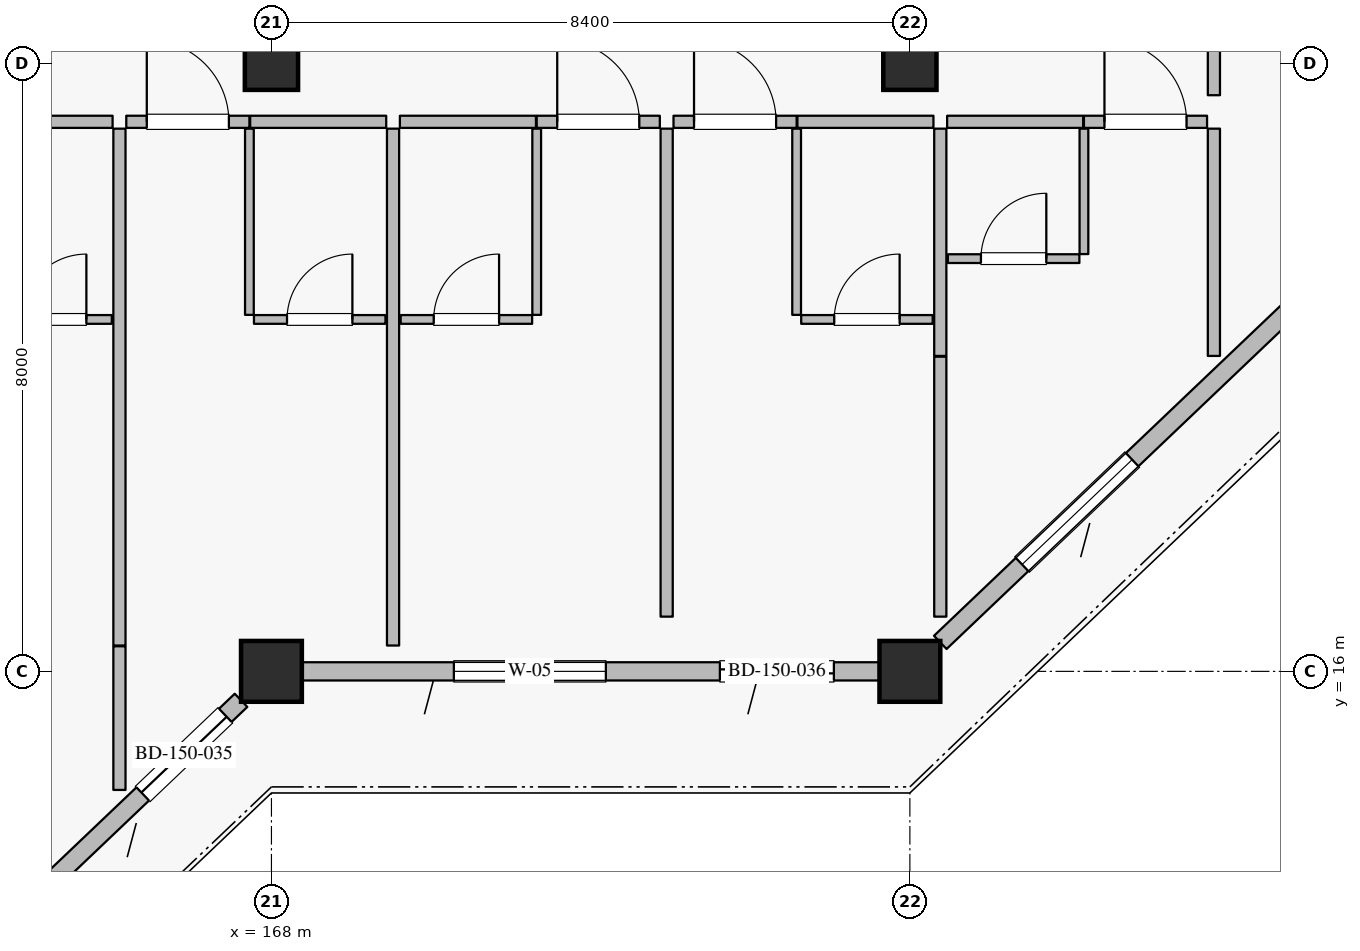
"""IFC4 building model, lengths in metres.
Left out: names, types, materials, properties, quantities, classifications, styles, units other than length and angle.
Written with IfcOpenShell. Run it as: python <this file> out.ifc"""

import sys

from ifc_helpers import new_model, si_unit, direction, frame, frame_2d, origin, origin_2d, place, context, subcontext, project, spatial, rectangle, extrude, element, fill, save


model = new_model("IFC4")
c1 = context("Model", 3, precision=1e-05, world=origin(), true_north=direction((0.0, 1.0)))
c2 = subcontext(c1, "Body", "Model", "MODEL_VIEW")
j1 = project(units=[si_unit("LENGTHUNIT", "METRE"), si_unit("PLANEANGLEUNIT", "RADIAN")], contexts=[c1])
p1 = place(None, origin())
s1 = spatial("IfcSite", under=j1, at=p1, CompositionType="ELEMENT")
p2 = place(p1, origin())
s2 = spatial("IfcBuilding", under=s1, at=p2, CompositionType="ELEMENT")
p3 = place(p2, frame((0.0, 0.0, 21.0)))
s3 = spatial("IfcBuildingStorey", under=s2, at=p3, CompositionType="ELEMENT", Elevation=21.0)
for number, where, z_axis, x_axis in (
    (1, (168.0, 16.0, 0.0), (0.0, 0.0, 1.0), (1.0, 0.0, 0.0)),
    (2, (176.4, 16.0, 0.0), (0.0, 0.0, 1.0), (1.0, 0.0, 0.0)),
):
    element("IfcColumn", number, at=place(p3, frame(where, z_axis=z_axis, x_axis=x_axis)), inside=s3, PredefinedType="COLUMN", context=c2, shape_type="SweptSolid", body=[
        extrude(rectangle(XDim=0.8, YDim=0.8, at=origin_2d()), origin(), (0.0, 0.0, 1.0), 4.2),
    ])
for number, where, z_axis, x_axis in (
    (3, (168.0, 24.0, 0.0), (0.0, 0.0, 1.0), (1.0, 0.0, 0.0)),
    (4, (176.4, 24.0, 0.0), (0.0, 0.0, 1.0), (1.0, 0.0, 0.0)),
):
    element("IfcColumn", number, at=place(p3, frame(where, z_axis=z_axis, x_axis=x_axis)), inside=s3, PredefinedType="COLUMN", context=c2, shape_type="SweptSolid", body=[
        extrude(rectangle(XDim=0.7, YDim=0.7, at=origin_2d()), origin(), (0.0, 0.0, 1.0), 4.2),
    ])
p4 = place(p3, frame((167.6, 15.619, 0.0), z_axis=(0.0, 0.0, 1.0), x_axis=(-0.724156739794, -0.689635422677, 0.0)))
e5 = element("IfcWall", 5, at=p4, inside=s3, PredefinedType="SOLIDWALL", context=c2, shape_type="SweptSolid", body=[
    extrude(rectangle(XDim=10.495, YDim=0.24, at=frame_2d((5.248, 0.0))), origin(), (0.0, 0.0, 1.0), 3.53),
])
p5 = place(p4, frame((0.286, 0.0, 0.0)))
e6 = element("IfcOpeningElement", 6, at=p5, cuts=e5, PredefinedType="OPENING", context=c2, shape_type="SweptSolid", body=[
    extrude(rectangle(XDim=1.5, YDim=2.25, at=frame_2d((0.75, 1.125))), frame((0.0, 0.13, 0.0), z_axis=(0.0, -1.0, 0.0), x_axis=(1.0, 0.0, 0.0)), (0.0, 0.0, 1.0), 0.26),
])
p6 = place(p4, frame((3.757, 0.0, 0.8)))
e7 = element("IfcOpeningElement", 7, at=p6, cuts=e5, PredefinedType="OPENING", context=c2, shape_type="SweptSolid", body=[
    extrude(rectangle(XDim=1.6, YDim=1.6, at=frame_2d((0.8, 0.8))), frame((0.0, 0.13, 0.0), z_axis=(0.0, -1.0, 0.0), x_axis=(1.0, 0.0, 0.0)), (0.0, 0.0, 1.0), 0.26),
])
p7 = place(p4, frame((7.969, 0.0, 0.8)))
e8 = element("IfcOpeningElement", 8, at=p7, cuts=e5, PredefinedType="OPENING", context=c2, shape_type="SweptSolid", body=[
    extrude(rectangle(XDim=1.6, YDim=1.6, at=frame_2d((0.8, 0.8))), frame((0.0, 0.13, 0.0), z_axis=(0.0, -1.0, 0.0), x_axis=(1.0, 0.0, 0.0)), (0.0, 0.0, 1.0), 0.26),
])
p8 = place(p3, frame((176.0, 16.0, 0.0), z_axis=(0.0, 0.0, 1.0), x_axis=(-1.0, 0.0, 0.0)))
e9 = element("IfcWall", 9, at=p8, inside=s3, PredefinedType="SOLIDWALL", context=c2, shape_type="SweptSolid", body=[
    extrude(rectangle(XDim=7.6, YDim=0.24, at=frame_2d((3.8, 0.0))), origin(), (0.0, 0.0, 1.0), 3.53),
])
p9 = place(p8, frame((0.6, 0.0, 0.0)))
e10 = element("IfcOpeningElement", 10, at=p9, cuts=e9, PredefinedType="OPENING", context=c2, shape_type="SweptSolid", body=[
    extrude(rectangle(XDim=1.5, YDim=2.25, at=frame_2d((0.75, 1.125))), frame((0.0, 0.13, 0.0), z_axis=(0.0, -1.0, 0.0), x_axis=(1.0, 0.0, 0.0)), (0.0, 0.0, 1.0), 0.26),
])
p10 = place(p8, frame((3.6, 0.0, 0.8)))
e11 = element("IfcOpeningElement", 11, at=p10, cuts=e9, PredefinedType="OPENING", context=c2, shape_type="SweptSolid", body=[
    extrude(rectangle(XDim=2.0, YDim=1.75, at=frame_2d((1.0, 0.875))), frame((0.0, 0.13, 0.0), z_axis=(0.0, -1.0, 0.0), x_axis=(1.0, 0.0, 0.0)), (0.0, 0.0, 1.0), 0.26),
])
p11 = place(p3, frame((184.4, 23.619, 0.0), z_axis=(0.0, 0.0, 1.0), x_axis=(-0.724145676014, -0.689647040094, 0.0)))
e12 = element("IfcWall", 12, at=p11, inside=s3, PredefinedType="SOLIDWALL", context=c2, shape_type="SweptSolid", body=[
    extrude(rectangle(XDim=10.495, YDim=0.24, at=frame_2d((5.248, 0.0))), origin(), (0.0, 0.0, 1.0), 3.53),
])
p12 = place(p11, frame((2.288, 0.0, 0.0)))
e13 = element("IfcOpeningElement", 13, at=p12, cuts=e12, PredefinedType="OPENING", context=c2, shape_type="SweptSolid", body=[
    extrude(rectangle(XDim=1.5, YDim=2.25, at=frame_2d((0.75, 1.125))), frame((0.0, 0.13, 0.0), z_axis=(0.0, -1.0, 0.0), x_axis=(1.0, 0.0, 0.0)), (0.0, 0.0, 1.0), 0.26),
])
p13 = place(p11, frame((7.009, 0.0, 0.8)))
e14 = element("IfcOpeningElement", 14, at=p13, cuts=e12, PredefinedType="OPENING", context=c2, shape_type="SweptSolid", body=[
    extrude(rectangle(XDim=2.0, YDim=1.75, at=frame_2d((1.0, 0.875))), frame((0.0, 0.13, 0.0), z_axis=(0.0, -1.0, 0.0), x_axis=(1.0, 0.0, 0.0)), (0.0, 0.0, 1.0), 0.26),
])
p14 = place(p3, frame((164.32, 23.23, 0.0), z_axis=(0.0, 0.0, 1.0), x_axis=(1.0, 0.0, 0.0)))
e15 = element("IfcWall", 15, at=p14, inside=s3, PredefinedType="PARTITIONING", context=c2, shape_type="SweptSolid", body=[
    extrude(rectangle(XDim=1.59, YDim=0.16, at=frame_2d((0.795, 0.0))), origin(), (0.0, 0.0, 1.0), 3.965),
])
p15 = place(p3, frame((164.37, 20.63, 0.0), z_axis=(0.0, 0.0, 1.0), x_axis=(1.0, 0.0, 0.0)))
e16 = element("IfcWall", 16, at=p15, inside=s3, PredefinedType="PARTITIONING", context=c2, shape_type="SweptSolid", body=[
    extrude(rectangle(XDim=1.53, YDim=0.115, at=frame_2d((0.765, 0.0))), origin(), (0.0, 0.0, 1.0), 3.965),
])
p16 = place(p15, frame((0.335, 0.0, 0.0)))
e17 = element("IfcOpeningElement", 17, at=p16, cuts=e16, PredefinedType="OPENING", context=c2, shape_type="SweptSolid", body=[
    extrude(rectangle(XDim=0.86, YDim=2.12, at=frame_2d((0.43, 1.06))), frame((0.0, 0.067, 0.0), z_axis=(0.0, -1.0, 0.0), x_axis=(1.0, 0.0, 0.0)), (0.0, 0.0, 1.0), 0.135),
])
p17 = place(p3, frame((166.0, 14.44, 0.0), z_axis=(0.0, 0.0, 1.0), x_axis=(0.0, 1.0, 0.0)))
e18 = element("IfcWall", 18, at=p17, inside=s3, PredefinedType="PARTITIONING", context=c2, shape_type="SweptSolid", body=[
    extrude(rectangle(XDim=1.89, YDim=0.16, at=frame_2d((0.945, 0.0))), origin(), (0.0, 0.0, 1.0), 3.965),
])
p18 = place(p3, frame((166.09, 23.23, 0.0), z_axis=(0.0, 0.0, 1.0), x_axis=(1.0, 0.0, 0.0)))
e19 = element("IfcWall", 19, at=p18, inside=s3, PredefinedType="PARTITIONING", context=c2, shape_type="SweptSolid", body=[
    extrude(rectangle(XDim=1.62, YDim=0.16, at=frame_2d((0.81, 0.0))), origin(), (0.0, 0.0, 1.0), 3.965),
])
p19 = place(p18, frame((0.27, 0.0, 0.0)))
e20 = element("IfcOpeningElement", 20, at=p19, cuts=e19, PredefinedType="OPENING", context=c2, shape_type="SweptSolid", body=[
    extrude(rectangle(XDim=1.08, YDim=2.3, at=frame_2d((0.54, 1.15))), frame((0.0, 0.09, 0.0), z_axis=(0.0, -1.0, 0.0), x_axis=(1.0, 0.0, 0.0)), (0.0, 0.0, 1.0), 0.18),
])
p20 = place(p3, frame((167.72, 23.23, 0.0), z_axis=(0.0, 0.0, 1.0), x_axis=(1.0, 0.0, 0.0)))
e21 = element("IfcWall", 21, at=p20, inside=s3, PredefinedType="PARTITIONING", context=c2, shape_type="SweptSolid", body=[
    extrude(rectangle(XDim=1.79, YDim=0.16, at=frame_2d((0.895, 0.0))), origin(), (0.0, 0.0, 1.0), 3.965),
])
p21 = place(p3, frame((167.71, 20.69, 0.0), z_axis=(0.0, 0.0, 1.0), x_axis=(0.0, 1.0, 0.0)))
e22 = element("IfcWall", 22, at=p21, inside=s3, PredefinedType="PARTITIONING", context=c2, shape_type="SweptSolid", body=[
    extrude(rectangle(XDim=2.45, YDim=0.115, at=frame_2d((1.225, 0.0))), origin(), (0.0, 0.0, 1.0), 3.965),
])
p22 = place(p3, frame((167.77, 20.63, 0.0), z_axis=(0.0, 0.0, 1.0), x_axis=(1.0, 0.0, 0.0)))
e23 = element("IfcWall", 23, at=p22, inside=s3, PredefinedType="PARTITIONING", context=c2, shape_type="SweptSolid", body=[
    extrude(rectangle(XDim=1.73, YDim=0.115, at=frame_2d((0.865, 0.0))), origin(), (0.0, 0.0, 1.0), 3.965),
])
p23 = place(p22, frame((0.435, 0.0, 0.0)))
e24 = element("IfcOpeningElement", 24, at=p23, cuts=e23, PredefinedType="OPENING", context=c2, shape_type="SweptSolid", body=[
    extrude(rectangle(XDim=0.86, YDim=2.12, at=frame_2d((0.43, 1.06))), frame((0.0, 0.067, 0.0), z_axis=(0.0, -1.0, 0.0), x_axis=(1.0, 0.0, 0.0)), (0.0, 0.0, 1.0), 0.135),
])
p24 = place(p3, frame((166.0, 16.34, 0.0), z_axis=(0.0, 0.0, 1.0), x_axis=(0.0, 1.0, 0.0)))
e25 = element("IfcWall", 25, at=p24, inside=s3, PredefinedType="PARTITIONING", context=c2, shape_type="SweptSolid", body=[
    extrude(rectangle(XDim=6.8, YDim=0.16, at=frame_2d((3.4, 0.0))), origin(), (0.0, 0.0, 1.0), 3.965),
])
p25 = place(p3, frame((169.69, 23.23, 0.0), z_axis=(0.0, 0.0, 1.0), x_axis=(1.0, 0.0, 0.0)))
e26 = element("IfcWall", 26, at=p25, inside=s3, PredefinedType="PARTITIONING", context=c2, shape_type="SweptSolid", body=[
    extrude(rectangle(XDim=1.79, YDim=0.16, at=frame_2d((0.895, 0.0))), origin(), (0.0, 0.0, 1.0), 3.965),
])
p26 = place(p3, frame((171.49, 23.23, 0.0), z_axis=(0.0, 0.0, 1.0), x_axis=(1.0, 0.0, 0.0)))
e27 = element("IfcWall", 27, at=p26, inside=s3, PredefinedType="PARTITIONING", context=c2, shape_type="SweptSolid", body=[
    extrude(rectangle(XDim=1.62, YDim=0.16, at=frame_2d((0.81, 0.0))), origin(), (0.0, 0.0, 1.0), 3.965),
])
p27 = place(p26, frame((0.27, 0.0, 0.0)))
e28 = element("IfcOpeningElement", 28, at=p27, cuts=e27, PredefinedType="OPENING", context=c2, shape_type="SweptSolid", body=[
    extrude(rectangle(XDim=1.08, YDim=2.3, at=frame_2d((0.54, 1.15))), frame((0.0, 0.09, 0.0), z_axis=(0.0, -1.0, 0.0), x_axis=(1.0, 0.0, 0.0)), (0.0, 0.0, 1.0), 0.18),
])
p28 = place(p3, frame((171.49, 20.69, 0.0), z_axis=(0.0, 0.0, 1.0), x_axis=(0.0, 1.0, 0.0)))
e29 = element("IfcWall", 29, at=p28, inside=s3, PredefinedType="PARTITIONING", context=c2, shape_type="SweptSolid", body=[
    extrude(rectangle(XDim=2.45, YDim=0.115, at=frame_2d((1.225, 0.0))), origin(), (0.0, 0.0, 1.0), 3.965),
])
p29 = place(p3, frame((169.7, 20.63, 0.0), z_axis=(0.0, 0.0, 1.0), x_axis=(1.0, 0.0, 0.0)))
e30 = element("IfcWall", 30, at=p29, inside=s3, PredefinedType="PARTITIONING", context=c2, shape_type="SweptSolid", body=[
    extrude(rectangle(XDim=1.73, YDim=0.115, at=frame_2d((0.865, 0.0))), origin(), (0.0, 0.0, 1.0), 3.965),
])
p30 = place(p29, frame((0.435, 0.0, 0.0)))
e31 = element("IfcOpeningElement", 31, at=p30, cuts=e30, PredefinedType="OPENING", context=c2, shape_type="SweptSolid", body=[
    extrude(rectangle(XDim=0.86, YDim=2.12, at=frame_2d((0.43, 1.06))), frame((0.0, 0.067, 0.0), z_axis=(0.0, -1.0, 0.0), x_axis=(1.0, 0.0, 0.0)), (0.0, 0.0, 1.0), 0.135),
])
p31 = place(p3, frame((169.6, 16.34, 0.0), z_axis=(0.0, 0.0, 1.0), x_axis=(0.0, 1.0, 0.0)))
e32 = element("IfcWall", 32, at=p31, inside=s3, PredefinedType="PARTITIONING", context=c2, shape_type="SweptSolid", body=[
    extrude(rectangle(XDim=6.8, YDim=0.16, at=frame_2d((3.4, 0.0))), origin(), (0.0, 0.0, 1.0), 3.965),
])
p32 = place(p3, frame((173.29, 23.23, 0.0), z_axis=(0.0, 0.0, 1.0), x_axis=(1.0, 0.0, 0.0)))
e33 = element("IfcWall", 33, at=p32, inside=s3, PredefinedType="PARTITIONING", context=c2, shape_type="SweptSolid", body=[
    extrude(rectangle(XDim=1.62, YDim=0.16, at=frame_2d((0.81, 0.0))), origin(), (0.0, 0.0, 1.0), 3.965),
])
p33 = place(p32, frame((0.27, 0.0, 0.0)))
e34 = element("IfcOpeningElement", 34, at=p33, cuts=e33, PredefinedType="OPENING", context=c2, shape_type="SweptSolid", body=[
    extrude(rectangle(XDim=1.08, YDim=2.3, at=frame_2d((0.54, 1.15))), frame((0.0, 0.09, 0.0), z_axis=(0.0, -1.0, 0.0), x_axis=(1.0, 0.0, 0.0)), (0.0, 0.0, 1.0), 0.18),
])
p34 = place(p3, frame((174.92, 23.23, 0.0), z_axis=(0.0, 0.0, 1.0), x_axis=(1.0, 0.0, 0.0)))
e35 = element("IfcWall", 35, at=p34, inside=s3, PredefinedType="PARTITIONING", context=c2, shape_type="SweptSolid", body=[
    extrude(rectangle(XDim=1.79, YDim=0.16, at=frame_2d((0.895, 0.0))), origin(), (0.0, 0.0, 1.0), 3.965),
])
p35 = place(p3, frame((174.91, 20.69, 0.0), z_axis=(0.0, 0.0, 1.0), x_axis=(0.0, 1.0, 0.0)))
e36 = element("IfcWall", 36, at=p35, inside=s3, PredefinedType="PARTITIONING", context=c2, shape_type="SweptSolid", body=[
    extrude(rectangle(XDim=2.45, YDim=0.115, at=frame_2d((1.225, 0.0))), origin(), (0.0, 0.0, 1.0), 3.965),
])
p36 = place(p3, frame((174.97, 20.63, 0.0), z_axis=(0.0, 0.0, 1.0), x_axis=(1.0, 0.0, 0.0)))
e37 = element("IfcWall", 37, at=p36, inside=s3, PredefinedType="PARTITIONING", context=c2, shape_type="SweptSolid", body=[
    extrude(rectangle(XDim=1.73, YDim=0.115, at=frame_2d((0.865, 0.0))), origin(), (0.0, 0.0, 1.0), 3.965),
])
p37 = place(p36, frame((0.435, 0.0, 0.0)))
e38 = element("IfcOpeningElement", 38, at=p37, cuts=e37, PredefinedType="OPENING", context=c2, shape_type="SweptSolid", body=[
    extrude(rectangle(XDim=0.86, YDim=2.12, at=frame_2d((0.43, 1.06))), frame((0.0, 0.067, 0.0), z_axis=(0.0, -1.0, 0.0), x_axis=(1.0, 0.0, 0.0)), (0.0, 0.0, 1.0), 0.135),
])
p38 = place(p3, frame((173.2, 16.72, 0.0), z_axis=(0.0, 0.0, 1.0), x_axis=(0.0, 1.0, 0.0)))
e39 = element("IfcWall", 39, at=p38, inside=s3, PredefinedType="PARTITIONING", context=c2, shape_type="SweptSolid", body=[
    extrude(rectangle(XDim=6.42, YDim=0.16, at=frame_2d((3.21, 0.0))), origin(), (0.0, 0.0, 1.0), 3.965),
])
p39 = place(p3, frame((176.8, 16.72, 0.0), z_axis=(0.0, 0.0, 1.0), x_axis=(0.0, 1.0, 0.0)))
e40 = element("IfcWall", 40, at=p39, inside=s3, PredefinedType="PARTITIONING", context=c2, shape_type="SweptSolid", body=[
    extrude(rectangle(XDim=3.42, YDim=0.16, at=frame_2d((1.71, 0.0))), origin(), (0.0, 0.0, 1.0), 3.965),
])
p40 = place(p3, frame((176.89, 23.23, 0.0), z_axis=(0.0, 0.0, 1.0), x_axis=(1.0, 0.0, 0.0)))
e41 = element("IfcWall", 41, at=p40, inside=s3, PredefinedType="PARTITIONING", context=c2, shape_type="SweptSolid", body=[
    extrude(rectangle(XDim=1.79, YDim=0.16, at=frame_2d((0.895, 0.0))), origin(), (0.0, 0.0, 1.0), 3.965),
])
p41 = place(p3, frame((178.69, 23.23, 0.0), z_axis=(0.0, 0.0, 1.0), x_axis=(1.0, 0.0, 0.0)))
e42 = element("IfcWall", 42, at=p41, inside=s3, PredefinedType="PARTITIONING", context=c2, shape_type="SweptSolid", body=[
    extrude(rectangle(XDim=1.62, YDim=0.16, at=frame_2d((0.81, 0.0))), origin(), (0.0, 0.0, 1.0), 3.965),
])
p42 = place(p41, frame((0.27, 0.0, 0.0)))
e43 = element("IfcOpeningElement", 43, at=p42, cuts=e42, PredefinedType="OPENING", context=c2, shape_type="SweptSolid", body=[
    extrude(rectangle(XDim=1.08, YDim=2.3, at=frame_2d((0.54, 1.15))), frame((0.0, 0.09, 0.0), z_axis=(0.0, -1.0, 0.0), x_axis=(1.0, 0.0, 0.0)), (0.0, 0.0, 1.0), 0.18),
])
p43 = place(p3, frame((178.69, 21.49, 0.0), z_axis=(0.0, 0.0, 1.0), x_axis=(0.0, 1.0, 0.0)))
e44 = element("IfcWall", 44, at=p43, inside=s3, PredefinedType="PARTITIONING", context=c2, shape_type="SweptSolid", body=[
    extrude(rectangle(XDim=1.65, YDim=0.115, at=frame_2d((0.825, 0.0))), origin(), (0.0, 0.0, 1.0), 3.965),
])
p44 = place(p3, frame((176.9, 21.43, 0.0), z_axis=(0.0, 0.0, 1.0), x_axis=(1.0, 0.0, 0.0)))
e45 = element("IfcWall", 45, at=p44, inside=s3, PredefinedType="PARTITIONING", context=c2, shape_type="SweptSolid", body=[
    extrude(rectangle(XDim=1.73, YDim=0.115, at=frame_2d((0.865, 0.0))), origin(), (0.0, 0.0, 1.0), 3.965),
])
p45 = place(p44, frame((0.435, 0.0, 0.0)))
e46 = element("IfcOpeningElement", 46, at=p45, cuts=e45, PredefinedType="OPENING", context=c2, shape_type="SweptSolid", body=[
    extrude(rectangle(XDim=0.86, YDim=2.12, at=frame_2d((0.43, 1.06))), frame((0.0, 0.067, 0.0), z_axis=(0.0, -1.0, 0.0), x_axis=(1.0, 0.0, 0.0)), (0.0, 0.0, 1.0), 0.135),
])
for number, where, z_axis, x_axis in (
    (47, (176.8, 20.15, 0.0), (0.0, 0.0, 1.0), (0.0, 1.0, 0.0)),
    (48, (180.4, 20.15, 0.0), (0.0, 0.0, 1.0), (0.0, 1.0, 0.0)),
):
    element("IfcWall", number, at=place(p3, frame(where, z_axis=z_axis, x_axis=x_axis)), inside=s3, PredefinedType="PARTITIONING", context=c2, shape_type="SweptSolid", body=[
        extrude(rectangle(XDim=2.99, YDim=0.16, at=frame_2d((1.495, 0.0))), origin(), (0.0, 0.0, 1.0), 3.965),
    ])
p46 = place(p3, frame((180.4, 23.58, 0.0), z_axis=(0.0, 0.0, 1.0), x_axis=(0.0, 1.0, 0.0)))
e49 = element("IfcWall", 49, at=p46, inside=s3, PredefinedType="PARTITIONING", context=c2, shape_type="SweptSolid", body=[
    extrude(rectangle(XDim=7.56, YDim=0.16, at=frame_2d((3.78, 0.0))), origin(), (0.0, 0.0, 1.0), 3.965),
])
p47 = place(p5, origin())
e50 = element("IfcDoor", 50, at=p47, inside=s3, OperationType="SLIDING_TO_LEFT", PredefinedType="DOOR", context=c2, shape_type="SweptSolid", body=[
    extrude(rectangle(XDim=1.5, YDim=2.25, at=frame_2d((0.75, 1.125))), frame((0.0, 0.025, 0.0), z_axis=(0.0, -1.0, 0.0), x_axis=(1.0, 0.0, 0.0)), (0.0, 0.0, 1.0), 0.05),
])
fill(e6, e50)
p48 = place(p9, origin())
e51 = element("IfcDoor", 51, at=p48, inside=s3, OperationType="SLIDING_TO_LEFT", PredefinedType="DOOR", context=c2, shape_type="SweptSolid", body=[
    extrude(rectangle(XDim=1.5, YDim=2.25, at=frame_2d((0.75, 1.125))), frame((0.0, 0.025, 0.0), z_axis=(0.0, -1.0, 0.0), x_axis=(1.0, 0.0, 0.0)), (0.0, 0.0, 1.0), 0.05),
])
fill(e10, e51)
p49 = place(p10, origin())
e52 = element("IfcWindow", 52, at=p49, inside=s3, PartitioningType="DOUBLE_PANEL_VERTICAL", PredefinedType="WINDOW", context=c2, shape_type="SweptSolid", body=[
    extrude(rectangle(XDim=2.0, YDim=1.75, at=frame_2d((1.0, 0.875))), frame((0.0, 0.03, 0.0), z_axis=(0.0, -1.0, 0.0), x_axis=(1.0, 0.0, 0.0)), (0.0, 0.0, 1.0), 0.06),
])
fill(e11, e52)
p50 = place(p13, origin())
e53 = element("IfcWindow", 53, at=p50, inside=s3, PartitioningType="DOUBLE_PANEL_VERTICAL", PredefinedType="WINDOW", context=c2, shape_type="SweptSolid", body=[
    extrude(rectangle(XDim=2.0, YDim=1.75, at=frame_2d((1.0, 0.875))), frame((0.0, 0.03, 0.0), z_axis=(0.0, -1.0, 0.0), x_axis=(1.0, 0.0, 0.0)), (0.0, 0.0, 1.0), 0.06),
])
fill(e14, e53)
p51 = place(p16, origin())
e54 = element("IfcDoor", 54, at=p51, inside=s3, OperationType="SINGLE_SWING_RIGHT", PredefinedType="DOOR", context=c2, shape_type="SweptSolid", body=[
    extrude(rectangle(XDim=0.86, YDim=2.12, at=frame_2d((0.43, 1.06))), frame((0.0, 0.025, 0.0), z_axis=(0.0, -1.0, 0.0), x_axis=(1.0, 0.0, 0.0)), (0.0, 0.0, 1.0), 0.05),
])
fill(e17, e54)
p52 = place(p19, origin())
e55 = element("IfcDoor", 55, at=p52, inside=s3, OperationType="SINGLE_SWING_LEFT", PredefinedType="DOOR", context=c2, shape_type="SweptSolid", body=[
    extrude(rectangle(XDim=1.08, YDim=2.3, at=frame_2d((0.54, 1.15))), frame((0.0, 0.025, 0.0), z_axis=(0.0, -1.0, 0.0), x_axis=(1.0, 0.0, 0.0)), (0.0, 0.0, 1.0), 0.05),
])
fill(e20, e55)
p53 = place(p23, origin())
e56 = element("IfcDoor", 56, at=p53, inside=s3, OperationType="SINGLE_SWING_RIGHT", PredefinedType="DOOR", context=c2, shape_type="SweptSolid", body=[
    extrude(rectangle(XDim=0.86, YDim=2.12, at=frame_2d((0.43, 1.06))), frame((0.0, 0.025, 0.0), z_axis=(0.0, -1.0, 0.0), x_axis=(1.0, 0.0, 0.0)), (0.0, 0.0, 1.0), 0.05),
])
fill(e24, e56)
p54 = place(p27, origin())
e57 = element("IfcDoor", 57, at=p54, inside=s3, OperationType="SINGLE_SWING_LEFT", PredefinedType="DOOR", context=c2, shape_type="SweptSolid", body=[
    extrude(rectangle(XDim=1.08, YDim=2.3, at=frame_2d((0.54, 1.15))), frame((0.0, 0.025, 0.0), z_axis=(0.0, -1.0, 0.0), x_axis=(1.0, 0.0, 0.0)), (0.0, 0.0, 1.0), 0.05),
])
fill(e28, e57)
p55 = place(p30, origin())
e58 = element("IfcDoor", 58, at=p55, inside=s3, OperationType="SINGLE_SWING_RIGHT", PredefinedType="DOOR", context=c2, shape_type="SweptSolid", body=[
    extrude(rectangle(XDim=0.86, YDim=2.12, at=frame_2d((0.43, 1.06))), frame((0.0, 0.025, 0.0), z_axis=(0.0, -1.0, 0.0), x_axis=(1.0, 0.0, 0.0)), (0.0, 0.0, 1.0), 0.05),
])
fill(e31, e58)
p56 = place(p33, origin())
e59 = element("IfcDoor", 59, at=p56, inside=s3, OperationType="SINGLE_SWING_LEFT", PredefinedType="DOOR", context=c2, shape_type="SweptSolid", body=[
    extrude(rectangle(XDim=1.08, YDim=2.3, at=frame_2d((0.54, 1.15))), frame((0.0, 0.025, 0.0), z_axis=(0.0, -1.0, 0.0), x_axis=(1.0, 0.0, 0.0)), (0.0, 0.0, 1.0), 0.05),
])
fill(e34, e59)
p57 = place(p37, origin())
e60 = element("IfcDoor", 60, at=p57, inside=s3, OperationType="SINGLE_SWING_RIGHT", PredefinedType="DOOR", context=c2, shape_type="SweptSolid", body=[
    extrude(rectangle(XDim=0.86, YDim=2.12, at=frame_2d((0.43, 1.06))), frame((0.0, 0.025, 0.0), z_axis=(0.0, -1.0, 0.0), x_axis=(1.0, 0.0, 0.0)), (0.0, 0.0, 1.0), 0.05),
])
fill(e38, e60)
p58 = place(p42, origin())
e61 = element("IfcDoor", 61, at=p58, inside=s3, OperationType="SINGLE_SWING_LEFT", PredefinedType="DOOR", context=c2, shape_type="SweptSolid", body=[
    extrude(rectangle(XDim=1.08, YDim=2.3, at=frame_2d((0.54, 1.15))), frame((0.0, 0.025, 0.0), z_axis=(0.0, -1.0, 0.0), x_axis=(1.0, 0.0, 0.0)), (0.0, 0.0, 1.0), 0.05),
])
fill(e43, e61)
p59 = place(p45, origin())
e62 = element("IfcDoor", 62, at=p59, inside=s3, OperationType="SINGLE_SWING_RIGHT", PredefinedType="DOOR", context=c2, shape_type="SweptSolid", body=[
    extrude(rectangle(XDim=0.86, YDim=2.12, at=frame_2d((0.43, 1.06))), frame((0.0, 0.025, 0.0), z_axis=(0.0, -1.0, 0.0), x_axis=(1.0, 0.0, 0.0)), (0.0, 0.0, 1.0), 0.05),
])
fill(e46, e62)
save(model, sys.argv[1])
